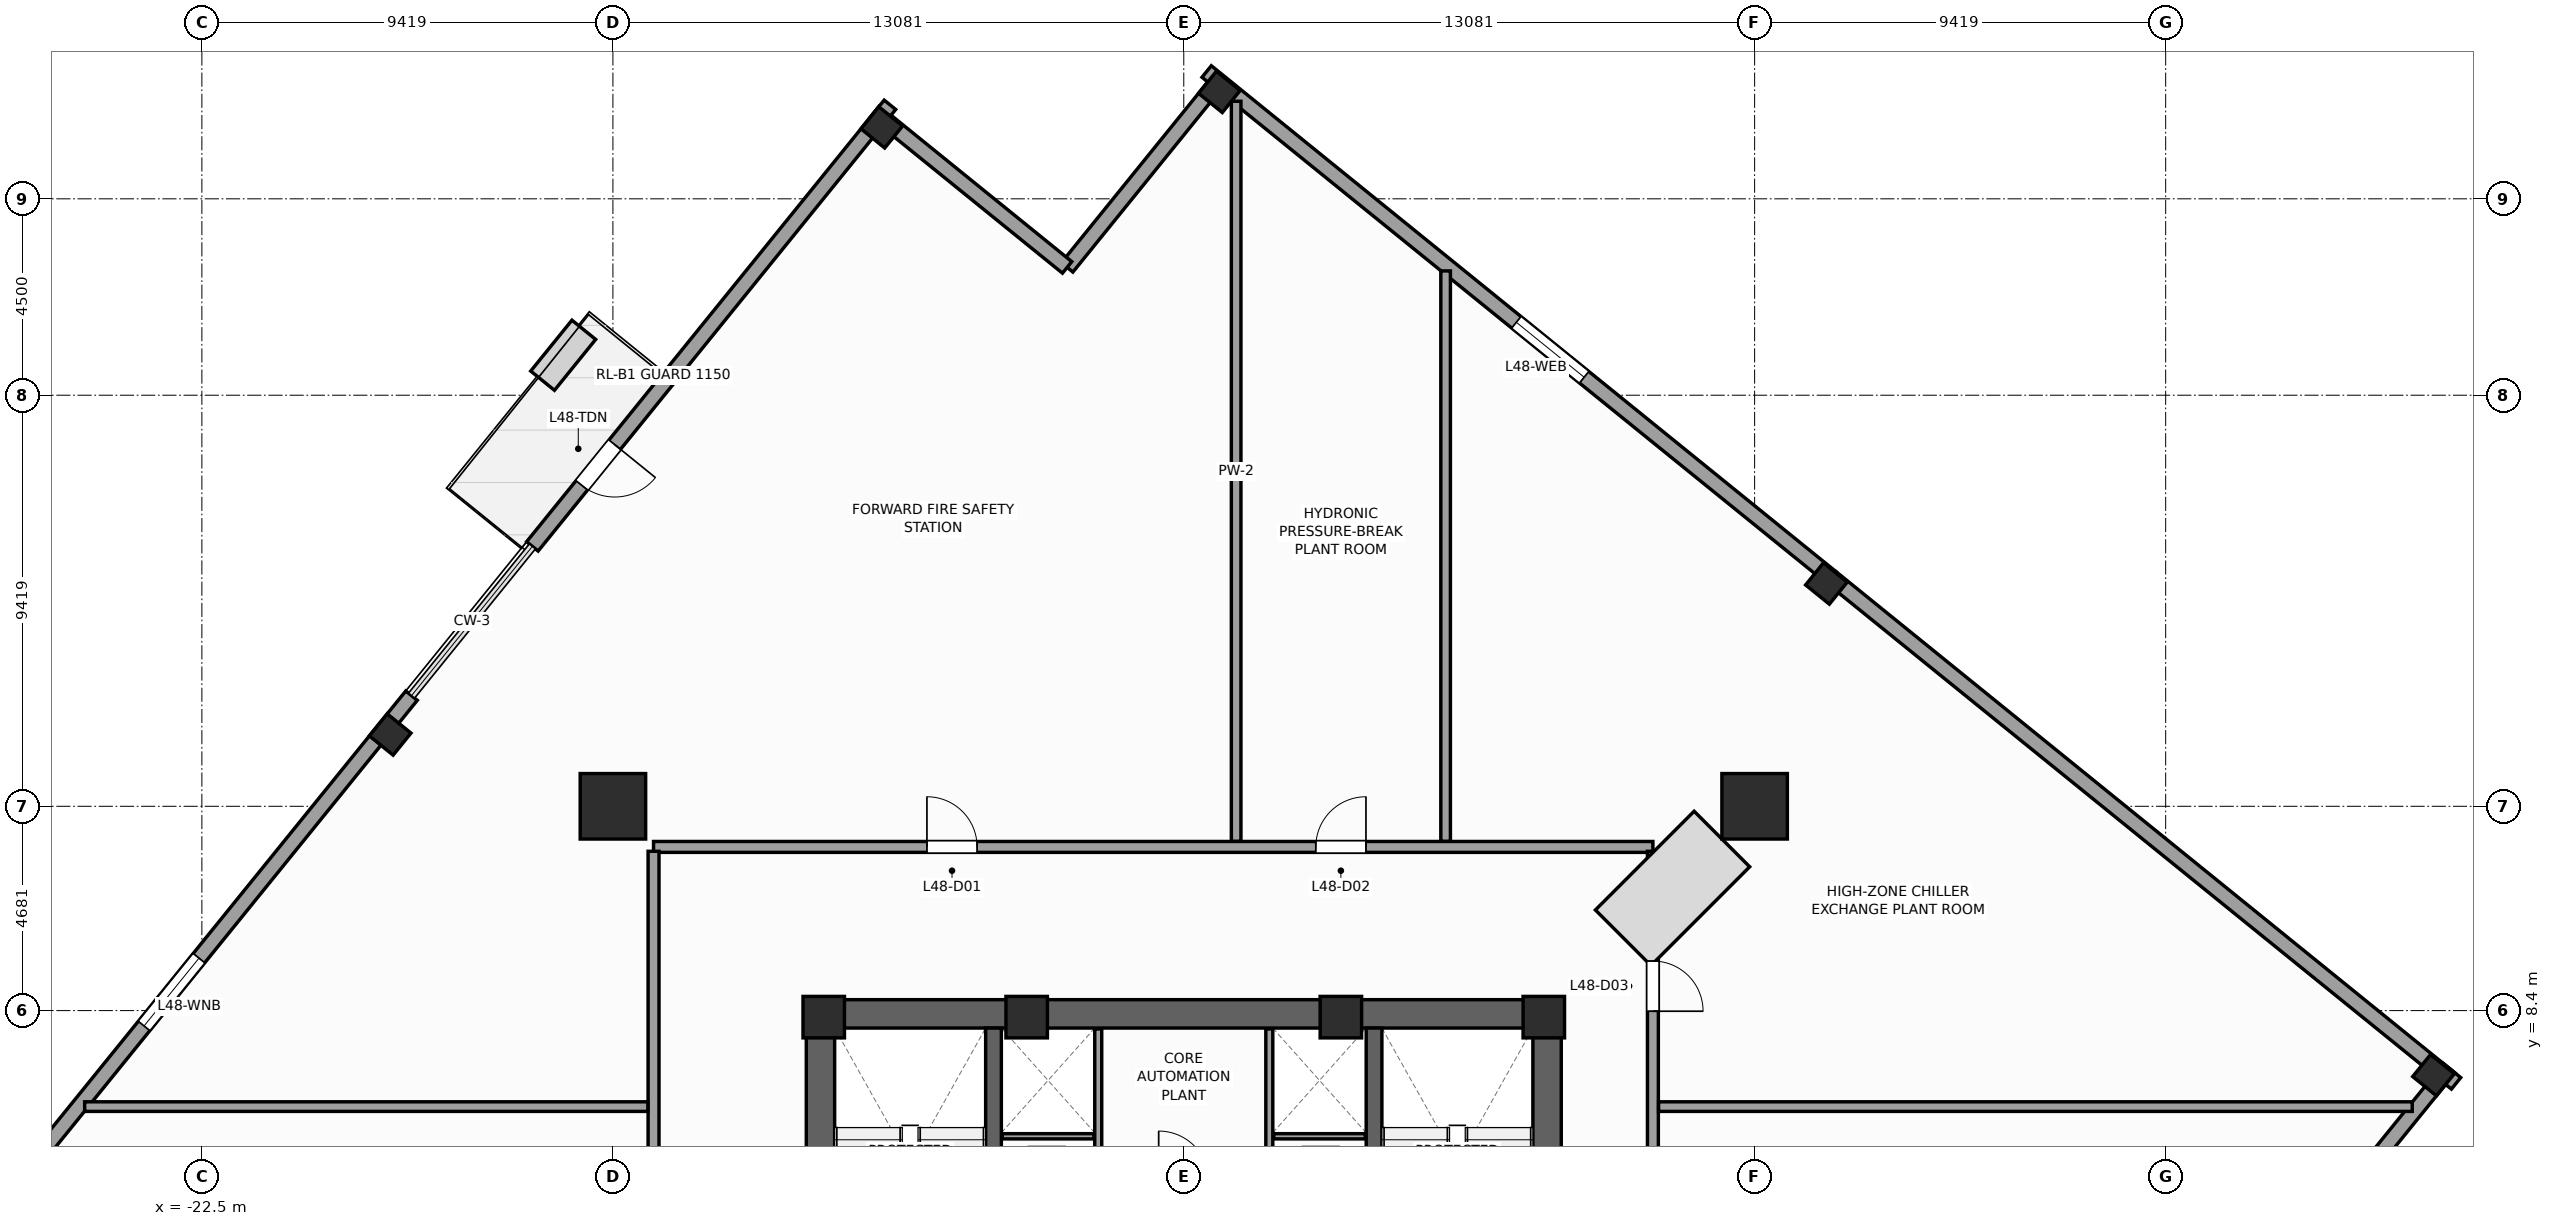
"""IFC4 building model, lengths in metres.
Left out: names, types, materials, properties, quantities, classifications, styles, units other than length and angle.
Written with IfcOpenShell. Run it as: python <this file> out.ifc"""

import sys

from ifc_helpers import new_model, si_unit, direction, frame, frame_2d, origin, origin_2d, place, context, subcontext, project, spatial, rectangle, extrude, source, transform, mapped, element, fill, save


model = new_model("IFC4")
c1 = context("Model", 3, precision=1e-05, world=origin(), true_north=direction((0.0, 1.0)))
c2 = subcontext(c1, "Body", "Model", "MODEL_VIEW")
j1 = project(units=[si_unit("LENGTHUNIT", "METRE"), si_unit("PLANEANGLEUNIT", "RADIAN")], contexts=[c1])
p1 = place(None, origin())
s1 = spatial("IfcSite", under=j1, at=p1, CompositionType="ELEMENT")
p2 = place(p1, origin())
s2 = spatial("IfcBuilding", under=s1, at=p2, CompositionType="ELEMENT")
p3 = place(p2, frame((0.0, 0.0, 200.4)))
s3 = spatial("IfcBuildingStorey", under=s2, at=p3, CompositionType="ELEMENT", Elevation=200.4)
p4 = place(p3, frame((-8.65, 8.325, 0.0), z_axis=(0.0, 0.0, 1.0), x_axis=(1.0, 0.0, 0.0)))
e1 = element("IfcWall", 1, at=p4, inside=s3, PredefinedType="SHEAR", context=c2, shape_type="SweptSolid", body=[
    extrude(rectangle(XDim=17.3, YDim=0.65, at=frame_2d((8.65, 0.0))), origin(), (0.0, 0.0, 1.0), 5.2),
])
p5 = place(p3, frame((-8.325, -8.0, 0.0), z_axis=(0.0, 0.0, 1.0), x_axis=(0.0, 1.0, 0.0)))
e2 = element("IfcWall", 2, at=p5, inside=s3, PredefinedType="SHEAR", context=c2, shape_type="SweptSolid", body=[
    extrude(rectangle(XDim=16.0, YDim=0.65, at=frame_2d((8.0, 0.0))), origin(), (0.0, 0.0, 1.0), 5.2),
])
p6 = place(p5, frame((4.69, 0.0, 0.0)))
e3 = element("IfcOpeningElement", 3, at=p6, cuts=e2, PredefinedType="OPENING", context=c2, shape_type="SweptSolid", body=[
    extrude(rectangle(XDim=1.3, YDim=2.2, at=frame_2d((0.65, 1.1))), frame((0.0, 0.335, 0.0), z_axis=(0.0, -1.0, 0.0), x_axis=(1.0, 0.0, 0.0)), (0.0, 0.0, 1.0), 0.67),
])
p7 = place(p3, frame((8.325, -8.0, 0.0), z_axis=(0.0, 0.0, 1.0), x_axis=(0.0, 1.0, 0.0)))
e4 = element("IfcWall", 4, at=p7, inside=s3, PredefinedType="SHEAR", context=c2, shape_type="SweptSolid", body=[
    extrude(rectangle(XDim=16.0, YDim=0.65, at=frame_2d((8.0, 0.0))), origin(), (0.0, 0.0, 1.0), 5.2),
])
p8 = place(p7, frame((4.69, 0.0, 0.0)))
e5 = element("IfcOpeningElement", 5, at=p8, cuts=e4, PredefinedType="OPENING", context=c2, shape_type="SweptSolid", body=[
    extrude(rectangle(XDim=1.3, YDim=2.2, at=frame_2d((0.65, 1.1))), frame((0.0, 0.335, 0.0), z_axis=(0.0, -1.0, 0.0), x_axis=(1.0, 0.0, 0.0)), (0.0, 0.0, 1.0), 0.67),
])
for number, where, z_axis, x_axis in (
    (6, (-4.36, -8.0, 0.0), (0.0, 0.0, 1.0), (0.0, 1.0, 0.0)),
    (7, (4.36, -8.0, 0.0), (0.0, 0.0, 1.0), (0.0, 1.0, 0.0)),
):
    element("IfcWall", number, at=place(p3, frame(where, z_axis=z_axis, x_axis=x_axis)), inside=s3, PredefinedType="SHEAR", context=c2, shape_type="SweptSolid", body=[
        extrude(rectangle(XDim=16.0, YDim=0.36, at=frame_2d((8.0, 0.0))), origin(), (0.0, 0.0, 1.0), 5.2),
    ])
m1 = source(origin(), c2, "Body", "SweptSolid", [
    extrude(rectangle(XDim=0.95, YDim=0.95, at=origin_2d()), origin(), (0.0, 0.0, 1.0), 5.2),
])
for number, where, z_axis, x_axis in (
    (8, (8.25, 8.25, 0.0), (0.0, 0.0, 1.0), (1.0, 0.0, 0.0)),
    (9, (-8.25, 8.25, 0.0), (0.0, 0.0, 1.0), (1.0, 0.0, 0.0)),
    (10, (-3.6, 8.25, 0.0), (0.0, 0.0, 1.0), (1.0, 0.0, 0.0)),
    (11, (3.6, 8.25, 0.0), (0.0, 0.0, 1.0), (1.0, 0.0, 0.0)),
):
    element("IfcColumn", number, at=place(p3, frame(where, z_axis=z_axis, x_axis=x_axis)), inside=s3, PredefinedType="PILASTER", context=c2, shape_type="MappedRepresentation", body=[
        mapped(m1, transform((0.0, 0.0, 0.0), scale=1.0)),
    ])
m2 = source(origin(), c2, "Body", "SweptSolid", [
    extrude(rectangle(XDim=1.5, YDim=1.5, at=origin_2d()), origin(), (0.0, 0.0, 1.0), 5.2),
])
for number, where, z_axis, x_axis in (
    (12, (13.081, 13.081, 0.0), (0.0, 0.0, 1.0), (1.0, 0.0, 0.0)),
    (13, (-13.081, 13.081, 0.0), (0.0, 0.0, 1.0), (1.0, 0.0, 0.0)),
):
    element("IfcColumn", number, at=place(p3, frame(where, z_axis=z_axis, x_axis=x_axis)), inside=s3, PredefinedType="COLUMN", context=c2, shape_type="MappedRepresentation", body=[
        mapped(m2, transform((0.0, 0.0, 0.0), scale=1.0)),
    ])
m3 = source(origin(), c2, "Body", "SweptSolid", [
    extrude(rectangle(XDim=0.65, YDim=0.7, at=origin_2d()), origin(), (0.0, 0.0, 1.0), 5.2),
])
for number, where, z_axis, x_axis in (
    (14, (28.637, 6.92, 0.0), (0.0, 0.0, 1.0), (0.629, 0.777, 0.0)),
    (15, (14.726, 18.185, 0.0), (0.0, 0.0, 1.0), (0.629, 0.777, 0.0)),
    (16, (0.815, 29.45, 0.0), (0.0, 0.0, 1.0), (0.629, 0.777, 0.0)),
    (17, (-6.92, 28.637, 0.0), (0.0, 0.0, 1.0), (0.629, 0.777, 0.0)),
    (18, (-18.185, 14.726, 0.0), (0.0, 0.0, 1.0), (0.629, 0.777, 0.0)),
):
    element("IfcColumn", number, at=place(p3, frame(where, z_axis=z_axis, x_axis=x_axis)), inside=s3, PredefinedType="COLUMN", context=c2, shape_type="MappedRepresentation", body=[
        mapped(m3, transform((0.0, 0.0, 0.0), scale=1.0)),
    ])
p9 = place(p3, frame((25.429, 2.673, 0.0), z_axis=(0.0, 0.0, 1.0), x_axis=(0.629299794138, 0.777162640055, 0.0)))
e19 = element("IfcWall", 19, at=p9, inside=s3, PredefinedType="STANDARD", context=c2, shape_type="SweptSolid", body=[
    extrude(rectangle(XDim=5.67, YDim=0.34, at=frame_2d((2.835, 0.0))), origin(), (0.0, 0.0, 1.0), 4.96),
])
p10 = place(p3, frame((0.789, 29.703, 0.0), z_axis=(0.0, 0.0, 1.0), x_axis=(-0.629323365087, -0.77714355312, 0.0)))
e20 = element("IfcWall", 20, at=p10, inside=s3, PredefinedType="STANDARD", context=c2, shape_type="SweptSolid", body=[
    extrude(rectangle(XDim=5.5, YDim=0.34, at=frame_2d((2.75, 0.0))), origin(), (0.0, 0.0, 1.0), 4.96),
])
p11 = place(p3, frame((-2.673, 25.429, 0.0), z_axis=(0.0, 0.0, 1.0), x_axis=(-0.777162640055, 0.629299794138, 0.0)))
e21 = element("IfcWall", 21, at=p11, inside=s3, PredefinedType="STANDARD", context=c2, shape_type="SweptSolid", body=[
    extrude(rectangle(XDim=5.67, YDim=0.34, at=frame_2d((2.835, 0.0))), origin(), (0.0, 0.0, 1.0), 4.96),
])
p12 = place(p3, frame((29.154, 6.733, 0.0), z_axis=(0.0, 0.0, 1.0), x_axis=(-0.777138681893, 0.629329380456, 0.0)))
e22 = element("IfcWall", 22, at=p12, inside=s3, PredefinedType="STANDARD", context=c2, shape_type="SweptSolid", body=[
    extrude(rectangle(XDim=18.42, YDim=0.34, at=frame_2d((9.21, 0.0))), origin(), (0.0, 0.0, 1.0), 4.26),
])
p13 = place(p3, frame((14.839, 18.325, 0.0), z_axis=(0.0, 0.0, 1.0), x_axis=(-0.777145164153, 0.629321375637, 0.0)))
e23 = element("IfcWall", 23, at=p13, inside=s3, PredefinedType="STANDARD", context=c2, shape_type="SweptSolid", body=[
    extrude(rectangle(XDim=18.42, YDim=0.34, at=frame_2d((9.21, 0.0))), origin(), (0.0, 0.0, 1.0), 4.26),
])
p14 = place(p13, frame((7.289, 0.0, 0.65)))
e24 = element("IfcOpeningElement", 24, at=p14, cuts=e23, PredefinedType="OPENING", context=c2, shape_type="SweptSolid", body=[
    extrude(rectangle(XDim=2.0, YDim=1.45, at=frame_2d((1.0, 0.725))), frame((0.0, 0.18, 0.0), z_axis=(0.0, -1.0, 0.0), x_axis=(1.0, 0.0, 0.0)), (0.0, 0.0, 1.0), 0.36),
])
p15 = place(p3, frame((-6.733, 29.154, 0.0), z_axis=(0.0, 0.0, 1.0), x_axis=(-0.629326061894, -0.777141369263, 0.0)))
e25 = element("IfcWall", 25, at=p15, inside=s3, PredefinedType="STANDARD", context=c2, shape_type="SweptSolid", body=[
    extrude(rectangle(XDim=13.02, YDim=0.34, at=frame_2d((6.51, 0.0))), origin(), (0.0, 0.0, 1.0), 4.26),
])
p16 = place(p15, frame((10.02, 0.0, 0.0)))
e26 = element("IfcOpeningElement", 26, at=p16, cuts=e25, PredefinedType="OPENING", context=c2, shape_type="SweptSolid", body=[
    extrude(rectangle(XDim=1.2, YDim=2.3, at=frame_2d((0.6, 1.15))), frame((0.0, 0.18, 0.0), z_axis=(0.0, -1.0, 0.0), x_axis=(1.0, 0.0, 0.0)), (0.0, 0.0, 1.0), 0.36),
])
p17 = place(p3, frame((-17.696, 15.616, 0.0), z_axis=(0.0, 0.0, 1.0), x_axis=(-0.629324798011, -0.777142392749, 0.0)))
e27 = element("IfcWall", 27, at=p17, inside=s3, PredefinedType="STANDARD", context=c2, shape_type="SweptSolid", body=[
    extrude(rectangle(XDim=19.42, YDim=0.34, at=frame_2d((9.71, 0.0))), origin(), (0.0, 0.0, 1.0), 4.26),
])
p18 = place(p17, frame((7.739, 0.0, 0.65)))
e28 = element("IfcOpeningElement", 28, at=p18, cuts=e27, PredefinedType="OPENING", context=c2, shape_type="SweptSolid", body=[
    extrude(rectangle(XDim=2.0, YDim=1.45, at=frame_2d((1.0, 0.725))), frame((0.0, 0.18, 0.0), z_axis=(0.0, -1.0, 0.0), x_axis=(1.0, 0.0, 0.0)), (0.0, 0.0, 1.0), 0.36),
])
for number, where, z_axis, x_axis in (
    (29, (-1.96, 4.58, 0.0), (0.0, 0.0, 1.0), (0.0, 1.0, 0.0)),
    (30, (1.96, 4.58, 0.0), (0.0, 0.0, 1.0), (0.0, 1.0, 0.0)),
):
    element("IfcWall", number, at=place(p3, frame(where, z_axis=z_axis, x_axis=x_axis)), inside=s3, PredefinedType="PARTITIONING", context=c2, shape_type="SweptSolid", body=[
        extrude(rectangle(XDim=3.4, YDim=0.16, at=frame_2d((1.7, 0.0))), origin(), (0.0, 0.0, 1.0), 4.96),
    ])
for number, where, z_axis, x_axis in (
    (31, (-4.16, 5.52, 0.0), (0.0, 0.0, 1.0), (1.0, 0.0, 0.0)),
    (32, (2.06, 5.52, 0.0), (0.0, 0.0, 1.0), (1.0, 0.0, 0.0)),
):
    element("IfcWall", number, at=place(p3, frame(where, z_axis=z_axis, x_axis=x_axis)), inside=s3, PredefinedType="PARTITIONING", context=c2, shape_type="SweptSolid", body=[
        extrude(rectangle(XDim=2.1, YDim=0.12, at=frame_2d((1.05, 0.0))), origin(), (0.0, 0.0, 1.0), 4.96),
    ])
p19 = place(p3, frame((-12.15, 12.15, 0.0), z_axis=(0.0, 0.0, 1.0), x_axis=(1.0, 0.0, 0.0)))
e33 = element("IfcWall", 33, at=p19, inside=s3, PredefinedType="PARTITIONING", context=c2, shape_type="SweptSolid", body=[
    extrude(rectangle(XDim=22.9, YDim=0.25, at=frame_2d((11.45, 0.0))), origin(), (0.0, 0.0, 1.0), 4.96),
])
p20 = place(p19, frame((6.264, 0.0, 0.0)))
e34 = element("IfcOpeningElement", 34, at=p20, cuts=e33, PredefinedType="OPENING", context=c2, shape_type="SweptSolid", body=[
    extrude(rectangle(XDim=1.15, YDim=2.25, at=frame_2d((0.575, 1.125))), frame((0.0, 0.135, 0.0), z_axis=(0.0, -1.0, 0.0), x_axis=(1.0, 0.0, 0.0)), (0.0, 0.0, 1.0), 0.27),
])
p21 = place(p19, frame((15.175, 0.0, 0.0)))
e35 = element("IfcOpeningElement", 35, at=p21, cuts=e33, PredefinedType="OPENING", context=c2, shape_type="SweptSolid", body=[
    extrude(rectangle(XDim=1.15, YDim=2.25, at=frame_2d((0.575, 1.125))), frame((0.0, 0.135, 0.0), z_axis=(0.0, -1.0, 0.0), x_axis=(1.0, 0.0, 0.0)), (0.0, 0.0, 1.0), 0.27),
])
p22 = place(p3, frame((-12.15, -12.05, 0.0), z_axis=(0.0, 0.0, 1.0), x_axis=(0.0, 1.0, 0.0)))
e36 = element("IfcWall", 36, at=p22, inside=s3, PredefinedType="PARTITIONING", context=c2, shape_type="SweptSolid", body=[
    extrude(rectangle(XDim=24.1, YDim=0.25, at=frame_2d((12.05, 0.0))), origin(), (0.0, 0.0, 1.0), 4.96),
])
p23 = place(p22, frame((11.475, 0.0, 0.0)))
e37 = element("IfcOpeningElement", 37, at=p23, cuts=e36, PredefinedType="OPENING", context=c2, shape_type="SweptSolid", body=[
    extrude(rectangle(XDim=1.15, YDim=2.25, at=frame_2d((0.575, 1.125))), frame((0.0, 0.135, 0.0), z_axis=(0.0, -1.0, 0.0), x_axis=(1.0, 0.0, 0.0)), (0.0, 0.0, 1.0), 0.27),
])
p24 = place(p3, frame((10.75, -12.05, 0.0), z_axis=(0.0, 0.0, 1.0), x_axis=(0.0, 1.0, 0.0)))
e38 = element("IfcWall", 38, at=p24, inside=s3, PredefinedType="PARTITIONING", context=c2, shape_type="SweptSolid", body=[
    extrude(rectangle(XDim=24.1, YDim=0.25, at=frame_2d((12.05, 0.0))), origin(), (0.0, 0.0, 1.0), 4.96),
])
p25 = place(p24, frame((20.436, 0.0, 0.0)))
e39 = element("IfcOpeningElement", 39, at=p25, cuts=e38, PredefinedType="OPENING", context=c2, shape_type="SweptSolid", body=[
    extrude(rectangle(XDim=1.15, YDim=2.25, at=frame_2d((0.575, 1.125))), frame((0.0, 0.135, 0.0), z_axis=(0.0, -1.0, 0.0), x_axis=(1.0, 0.0, 0.0)), (0.0, 0.0, 1.0), 0.27),
])
p26 = place(p24, frame((11.475, 0.0, 0.0)))
e40 = element("IfcOpeningElement", 40, at=p26, cuts=e38, PredefinedType="OPENING", context=c2, shape_type="SweptSolid", body=[
    extrude(rectangle(XDim=1.15, YDim=2.25, at=frame_2d((0.575, 1.125))), frame((0.0, 0.135, 0.0), z_axis=(0.0, -1.0, 0.0), x_axis=(1.0, 0.0, 0.0)), (0.0, 0.0, 1.0), 0.27),
])
p27 = place(p3, frame((1.2, 12.28, 0.0), z_axis=(0.0, 0.0, 1.0), x_axis=(0.0, 1.0, 0.0)))
e41 = element("IfcWall", 41, at=p27, inside=s3, PredefinedType="PARTITIONING", context=c2, shape_type="SweptSolid", body=[
    extrude(rectangle(XDim=16.955, YDim=0.22, at=frame_2d((8.478, 0.0))), origin(), (0.0, 0.0, 1.0), 4.96),
])
p28 = place(p3, frame((6.0, 12.28, 0.0), z_axis=(0.0, 0.0, 1.0), x_axis=(0.0, 1.0, 0.0)))
e42 = element("IfcWall", 42, at=p28, inside=s3, PredefinedType="PARTITIONING", context=c2, shape_type="SweptSolid", body=[
    extrude(rectangle(XDim=13.068, YDim=0.22, at=frame_2d((6.534, 0.0))), origin(), (0.0, 0.0, 1.0), 4.96),
])
p29 = place(p3, frame((10.88, 6.2, 0.0), z_axis=(0.0, 0.0, 1.0), x_axis=(1.0, 0.0, 0.0)))
e43 = element("IfcWall", 43, at=p29, inside=s3, PredefinedType="PARTITIONING", context=c2, shape_type="SweptSolid", body=[
    extrude(rectangle(XDim=17.27, YDim=0.22, at=frame_2d((8.635, 0.0))), origin(), (0.0, 0.0, 1.0), 4.96),
])
p30 = place(p3, frame((-12.28, 6.2, 0.0), z_axis=(0.0, 0.0, 1.0), x_axis=(-1.0, 0.0, 0.0)))
e44 = element("IfcWall", 44, at=p30, inside=s3, PredefinedType="PARTITIONING", context=c2, shape_type="SweptSolid", body=[
    extrude(rectangle(XDim=12.906, YDim=0.22, at=frame_2d((6.453, 0.0))), origin(), (0.0, 0.0, 1.0), 4.96),
])
m4 = source(origin(), c2, "Body", "SweptSolid", [
    extrude(rectangle(XDim=2.0, YDim=1.45, at=frame_2d((1.0, 0.725))), frame((0.0, 0.03, 0.0), z_axis=(0.0, -1.0, 0.0), x_axis=(1.0, 0.0, 0.0)), (0.0, 0.0, 1.0), 0.06),
])
p31 = place(p14, origin())
e45 = element("IfcWindow", 45, at=p31, inside=s3, PartitioningType="SINGLE_PANEL", PredefinedType="WINDOW", context=c2, shape_type="MappedRepresentation", body=[
    mapped(m4, transform((0.0, 0.0, 0.0), scale=1.0)),
])
fill(e24, e45)
p32 = place(p18, origin())
e46 = element("IfcWindow", 46, at=p32, inside=s3, PartitioningType="SINGLE_PANEL", PredefinedType="WINDOW", context=c2, shape_type="MappedRepresentation", body=[
    mapped(m4, transform((0.0, 0.0, 0.0), scale=1.0)),
])
fill(e28, e46)
m5 = source(origin(), c2, "Body", "SweptSolid", [
    extrude(rectangle(XDim=1.2, YDim=2.3, at=frame_2d((0.6, 1.15))), frame((0.0, 0.025, 0.0), z_axis=(0.0, -1.0, 0.0), x_axis=(1.0, 0.0, 0.0)), (0.0, 0.0, 1.0), 0.05),
])
p33 = place(p16, origin())
e47 = element("IfcDoor", 47, at=p33, inside=s3, OperationType="SINGLE_SWING_LEFT", PredefinedType="DOOR", context=c2, shape_type="MappedRepresentation", body=[
    mapped(m5, transform((0.0, 0.0, 0.0), scale=1.0)),
])
fill(e26, e47)
m6 = source(origin(), c2, "Body", "SweptSolid", [
    extrude(rectangle(XDim=1.15, YDim=2.25, at=frame_2d((0.575, 1.125))), frame((0.0, 0.025, 0.0), z_axis=(0.0, -1.0, 0.0), x_axis=(1.0, 0.0, 0.0)), (0.0, 0.0, 1.0), 0.05),
])
p34 = place(p20, origin())
e48 = element("IfcDoor", 48, at=p34, inside=s3, OperationType="SINGLE_SWING_LEFT", PredefinedType="DOOR", context=c2, shape_type="MappedRepresentation", body=[
    mapped(m6, transform((0.0, 0.0, 0.0), scale=1.0)),
])
fill(e34, e48)
p35 = place(p21, origin())
e49 = element("IfcDoor", 49, at=p35, inside=s3, OperationType="SINGLE_SWING_RIGHT", PredefinedType="DOOR", context=c2, shape_type="MappedRepresentation", body=[
    mapped(m6, transform((0.0, 0.0, 0.0), scale=1.0)),
])
fill(e35, e49)
p36 = place(p25, frame((1.15, 0.0, 0.0), z_axis=(0.0, 0.0, 1.0), x_axis=(-1.0, 0.0, 0.0)))
e50 = element("IfcDoor", 50, at=p36, inside=s3, OperationType="SINGLE_SWING_LEFT", PredefinedType="DOOR", context=c2, shape_type="MappedRepresentation", body=[
    mapped(m6, transform((0.0, 0.0, 0.0), scale=1.0)),
])
fill(e39, e50)
save(model, sys.argv[1])
